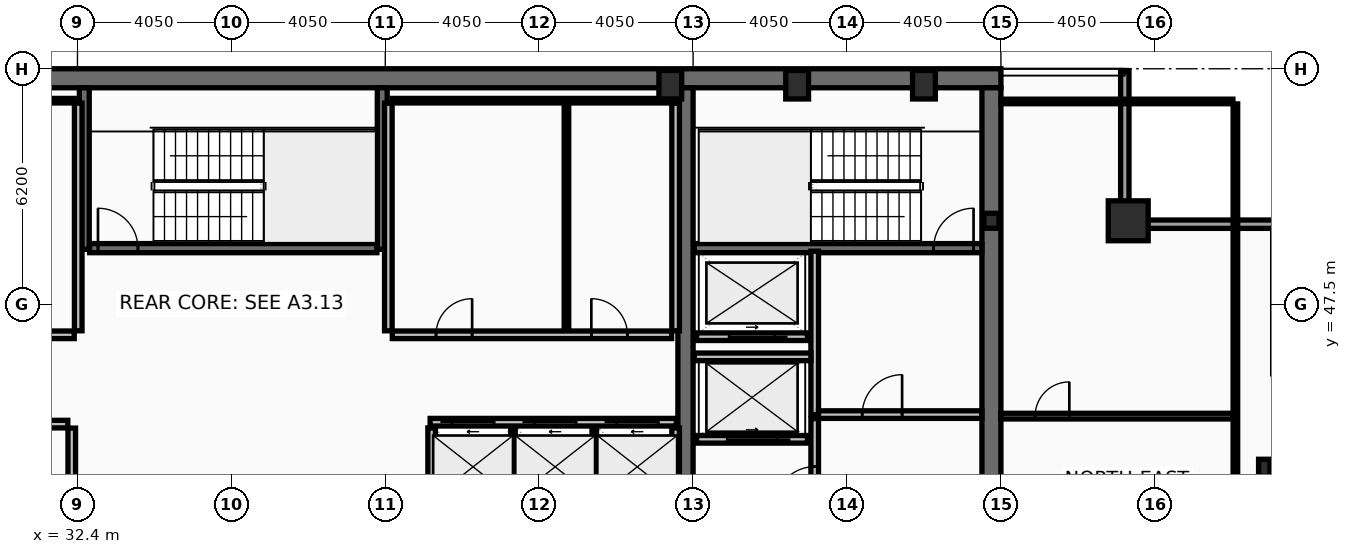
"""IFC4 building model, lengths in metres.
Left out: names, types, materials, properties, quantities, classifications, styles, units other than length and angle.
Written with IfcOpenShell. Run it as: python <this file> out.ifc"""

import sys

from ifc_helpers import new_model, si_unit, direction, frame, frame_2d, origin, origin_2d, place, context, subcontext, project, spatial, rectangle, hollow_rectangle, i_section, extrude, element, fill, save


model = new_model("IFC4")
c1 = context("Model", 3, precision=1e-05, world=origin(), true_north=direction((0.0, 1.0)))
c2 = subcontext(c1, "Body", "Model", "MODEL_VIEW")
j1 = project(units=[si_unit("LENGTHUNIT", "METRE"), si_unit("PLANEANGLEUNIT", "RADIAN")], contexts=[c1])
p1 = place(None, origin())
s1 = spatial("IfcSite", under=j1, at=p1, CompositionType="ELEMENT")
p2 = place(p1, origin())
s2 = spatial("IfcBuilding", under=s1, at=p2, CompositionType="ELEMENT")
p3 = place(p2, frame((0.0, 0.0, 277.0)))
s3 = spatial("IfcBuildingStorey", under=s2, at=p3, CompositionType="ELEMENT", Elevation=277.0)
p4 = place(p3, frame((16.2, 53.45, 0.0), z_axis=(0.0, 0.0, 1.0), x_axis=(1.0, 0.0, 0.0)))
e1 = element("IfcWall", 1, at=p4, inside=s3, PredefinedType="SHEAR", context=c2, shape_type="SweptSolid", body=[
    extrude(rectangle(XDim=40.5, YDim=0.5, at=frame_2d((20.25, 0.0))), origin(), (0.0, 0.0, 1.0), 3.44),
])
p5 = place(p3, frame((56.45, 53.2, 0.0), z_axis=(0.0, 0.0, 1.0), x_axis=(0.0, -1.0, 0.0)))
e2 = element("IfcWall", 2, at=p5, inside=s3, PredefinedType="SHEAR", context=c2, shape_type="SweptSolid", body=[
    extrude(rectangle(XDim=11.4, YDim=0.5, at=frame_2d((5.7, 0.0))), origin(), (0.0, 0.0, 1.0), 3.44),
])
p6 = place(p3, frame((48.4, 41.8, 0.0), z_axis=(0.0, 0.0, 1.0), x_axis=(0.0, 1.0, 0.0)))
e3 = element("IfcWall", 3, at=p6, inside=s3, PredefinedType="SHEAR", context=c2, shape_type="SweptSolid", body=[
    extrude(rectangle(XDim=11.4, YDim=0.4, at=frame_2d((5.7, 0.0))), origin(), (0.0, 0.0, 1.0), 3.44),
])
for number, where, z_axis, x_axis in (
    (4, (32.58, 48.95, 0.0), (0.0, 0.0, 1.0), (0.0, 1.0, 0.0)),
    (5, (40.42, 48.95, 0.0), (0.0, 0.0, 1.0), (0.0, 1.0, 0.0)),
):
    element("IfcWall", number, at=place(p3, frame(where, z_axis=z_axis, x_axis=x_axis)), inside=s3, PredefinedType="SHEAR", context=c2, shape_type="SweptSolid", body=[
        extrude(rectangle(XDim=4.25, YDim=0.26, at=frame_2d((2.125, 0.0))), origin(), (0.0, 0.0, 1.0), 3.44),
    ])
p7 = place(p3, frame((48.63, 48.98, 0.0), z_axis=(0.0, 0.0, 1.0), x_axis=(1.0, 0.0, 0.0)))
e6 = element("IfcWall", 6, at=p7, inside=s3, PredefinedType="SHEAR", context=c2, shape_type="SweptSolid", body=[
    extrude(rectangle(XDim=7.57, YDim=0.24, at=frame_2d((3.785, 0.0))), origin(), (0.0, 0.0, 1.0), 3.44),
])
p8 = place(p7, frame((6.3, 0.0, 0.0)))
e7 = element("IfcOpeningElement", 7, at=p8, cuts=e6, PredefinedType="OPENING", context=c2, shape_type="SweptSolid", body=[
    extrude(rectangle(XDim=1.05, YDim=2.15, at=frame_2d((0.525, 1.075))), frame((0.0, 0.13, 0.0), z_axis=(0.0, -1.0, 0.0), x_axis=(1.0, 0.0, 0.0)), (0.0, 0.0, 1.0), 0.26),
])
p9 = place(p3, frame((32.72, 48.98, 0.0), z_axis=(0.0, 0.0, 1.0), x_axis=(1.0, 0.0, 0.0)))
e8 = element("IfcWall", 8, at=p9, inside=s3, PredefinedType="SHEAR", context=c2, shape_type="SweptSolid", body=[
    extrude(rectangle(XDim=7.56, YDim=0.24, at=frame_2d((3.78, 0.0))), origin(), (0.0, 0.0, 1.0), 3.44),
])
p10 = place(p9, frame((0.22, 0.0, 0.0)))
e9 = element("IfcOpeningElement", 9, at=p10, cuts=e8, PredefinedType="OPENING", context=c2, shape_type="SweptSolid", body=[
    extrude(rectangle(XDim=1.05, YDim=2.15, at=frame_2d((0.525, 1.075))), frame((0.0, 0.13, 0.0), z_axis=(0.0, -1.0, 0.0), x_axis=(1.0, 0.0, 0.0)), (0.0, 0.0, 1.0), 0.26),
])
p11 = place(p3, frame((60.05, 49.7, 0.0), z_axis=(0.0, 0.0, 1.0), x_axis=(1.0, 0.0, 0.0)))
e10 = element("IfcColumn", 10, at=p11, inside=s3, PredefinedType="COLUMN", context=c2, shape_type="SweptSolid", body=[
    extrude(hollow_rectangle(XDim=1.05, YDim=1.05, WallThickness=0.055, at=origin_2d()), origin(), (0.0, 0.0, 1.0), 3.6),
])
for number, where, z_axis, x_axis in (
    (11, (48.0, 53.28, 0.0), (0.0, 0.0, 1.0), (1.0, 0.0, 0.0)),
    (12, (51.337, 53.28, 0.0), (0.0, 0.0, 1.0), (1.0, 0.0, 0.0)),
    (13, (54.675, 53.28, 0.0), (0.0, 0.0, 1.0), (1.0, 0.0, 0.0)),
):
    element("IfcColumn", number, at=place(p3, frame(where, z_axis=z_axis, x_axis=x_axis)), inside=s3, PredefinedType="COLUMN", context=c2, shape_type="SweptSolid", body=[
        extrude(hollow_rectangle(XDim=0.6, YDim=0.75, WallThickness=0.045, at=origin_2d()), origin(), (0.0, 0.0, 1.0), 3.6),
    ])
p12 = place(p3, frame((63.63, 43.2, 0.0), z_axis=(0.0, 0.0, 1.0), x_axis=(1.0, 0.0, 0.0)))
e14 = element("IfcColumn", 14, at=p12, inside=s3, PredefinedType="COLUMN", context=c2, shape_type="SweptSolid", body=[
    extrude(i_section(OverallWidth=0.3, OverallDepth=0.45, WebThickness=0.014, FlangeThickness=0.026, at=origin_2d()), origin(), (0.0, 0.0, 1.0), 3.6),
])
p13 = place(p3, frame((56.45, 49.7, 0.0), z_axis=(0.0, 0.0, 1.0), x_axis=(1.0, 0.0, 0.0)))
e15 = element("IfcColumn", 15, at=p13, inside=s3, PredefinedType="COLUMN", context=c2, shape_type="SweptSolid", body=[
    extrude(i_section(OverallWidth=0.399, OverallDepth=0.393, WebThickness=0.023, FlangeThickness=0.037, at=origin_2d()), origin(), (0.0, 0.0, 1.0), 3.6),
])
p14 = place(p3, frame((59.96, 53.63, 0.0), z_axis=(0.0, 0.0, 1.0), x_axis=(0.0, -1.0, 0.0)))
e16 = element("IfcWall", 16, at=p14, inside=s3, PredefinedType="SOLIDWALL", context=c2, shape_type="SweptSolid", body=[
    extrude(rectangle(XDim=3.91, YDim=0.22, at=frame_2d((1.955, 0.0))), origin(), (0.0, 0.0, 1.0), 2.88),
])
p15 = place(p3, frame((59.85, 49.61, 0.0), z_axis=(0.0, 0.0, 1.0), x_axis=(1.0, 0.0, 0.0)))
e17 = element("IfcWall", 17, at=p15, inside=s3, PredefinedType="SOLIDWALL", context=c2, shape_type="SweptSolid", body=[
    extrude(rectangle(XDim=4.22, YDim=0.22, at=frame_2d((2.11, 0.0))), origin(), (0.0, 0.0, 1.0), 2.88),
])
p16 = place(p3, frame((41.68, 44.4, 0.0), z_axis=(0.0, 0.0, 1.0), x_axis=(1.0, 0.0, 0.0)))
e18 = element("IfcWall", 18, at=p16, inside=s3, PredefinedType="PARTITIONING", context=c2, shape_type="SweptSolid", body=[
    extrude(rectangle(XDim=6.48, YDim=0.2, at=frame_2d((3.24, 0.0))), origin(), (0.0, 0.0, 1.0), 3.44),
])
p17 = place(p16, frame((0.58, 0.0, 0.0)))
e19 = element("IfcOpeningElement", 19, at=p17, cuts=e18, PredefinedType="OPENING", context=c2, shape_type="SweptSolid", body=[
    extrude(rectangle(XDim=1.1, YDim=2.18, at=frame_2d((0.55, 1.09))), frame((0.0, 0.11, 0.0), z_axis=(0.0, -1.0, 0.0), x_axis=(1.0, 0.0, 0.0)), (0.0, 0.0, 1.0), 0.22),
])
p18 = place(p16, frame((2.74, 0.0, 0.0)))
e20 = element("IfcOpeningElement", 20, at=p18, cuts=e18, PredefinedType="OPENING", context=c2, shape_type="SweptSolid", body=[
    extrude(rectangle(XDim=1.1, YDim=2.18, at=frame_2d((0.55, 1.09))), frame((0.0, 0.11, 0.0), z_axis=(0.0, -1.0, 0.0), x_axis=(1.0, 0.0, 0.0)), (0.0, 0.0, 1.0), 0.22),
])
p19 = place(p16, frame((4.9, 0.0, 0.0)))
e21 = element("IfcOpeningElement", 21, at=p19, cuts=e18, PredefinedType="OPENING", context=c2, shape_type="SweptSolid", body=[
    extrude(rectangle(XDim=1.1, YDim=2.18, at=frame_2d((0.55, 1.09))), frame((0.0, 0.11, 0.0), z_axis=(0.0, -1.0, 0.0), x_axis=(1.0, 0.0, 0.0)), (0.0, 0.0, 1.0), 0.22),
])
p20 = place(p3, frame((51.61, 43.95, 0.0), z_axis=(0.0, 0.0, 1.0), x_axis=(-1.0, 0.0, 0.0)))
e22 = element("IfcWall", 22, at=p20, inside=s3, PredefinedType="PARTITIONING", context=c2, shape_type="SweptSolid", body=[
    extrude(rectangle(XDim=2.92, YDim=0.2, at=frame_2d((1.46, 0.0))), origin(), (0.0, 0.0, 1.0), 3.44),
])
p21 = place(p20, frame((0.81, 0.0, 0.0)))
e23 = element("IfcOpeningElement", 23, at=p21, cuts=e22, PredefinedType="OPENING", context=c2, shape_type="SweptSolid", body=[
    extrude(rectangle(XDim=1.3, YDim=2.18, at=frame_2d((0.65, 1.09))), frame((0.0, 0.11, 0.0), z_axis=(0.0, -1.0, 0.0), x_axis=(1.0, 0.0, 0.0)), (0.0, 0.0, 1.0), 0.22),
])
p22 = place(p3, frame((51.61, 46.65, 0.0), z_axis=(0.0, 0.0, 1.0), x_axis=(-1.0, 0.0, 0.0)))
e24 = element("IfcWall", 24, at=p22, inside=s3, PredefinedType="PARTITIONING", context=c2, shape_type="SweptSolid", body=[
    extrude(rectangle(XDim=2.92, YDim=0.2, at=frame_2d((1.46, 0.0))), origin(), (0.0, 0.0, 1.0), 3.44),
])
p23 = place(p22, frame((0.86, 0.0, 0.0)))
e25 = element("IfcOpeningElement", 25, at=p23, cuts=e24, PredefinedType="OPENING", context=c2, shape_type="SweptSolid", body=[
    extrude(rectangle(XDim=1.2, YDim=2.18, at=frame_2d((0.6, 1.09))), frame((0.0, 0.11, 0.0), z_axis=(0.0, -1.0, 0.0), x_axis=(1.0, 0.0, 0.0)), (0.0, 0.0, 1.0), 0.22),
])
p24 = place(p3, frame((51.8, 44.6, 0.0), z_axis=(0.0, 0.0, 1.0), x_axis=(0.0, 1.0, 0.0)))
e26 = element("IfcWall", 26, at=p24, inside=s3, PredefinedType="PARTITIONING", context=c2, shape_type="SweptSolid", body=[
    extrude(rectangle(XDim=4.3, YDim=0.2, at=frame_2d((2.15, 0.0))), origin(), (0.0, 0.0, 1.0), 3.44),
])
p25 = place(p3, frame((51.9, 44.6, 0.0), z_axis=(0.0, 0.0, 1.0), x_axis=(1.0, 0.0, 0.0)))
e27 = element("IfcWall", 27, at=p25, inside=s3, PredefinedType="PARTITIONING", context=c2, shape_type="SweptSolid", body=[
    extrude(rectangle(XDim=4.3, YDim=0.2, at=frame_2d((2.15, 0.0))), origin(), (0.0, 0.0, 1.0), 3.44),
])
p26 = place(p25, frame((1.15, 0.0, 0.0)))
e28 = element("IfcOpeningElement", 28, at=p26, cuts=e27, PredefinedType="OPENING", context=c2, shape_type="SweptSolid", body=[
    extrude(rectangle(XDim=1.05, YDim=2.15, at=frame_2d((0.525, 1.075))), frame((0.0, 0.11, 0.0), z_axis=(0.0, -1.0, 0.0), x_axis=(1.0, 0.0, 0.0)), (0.0, 0.0, 1.0), 0.22),
])
p27 = place(p3, frame((48.63, 46.12, 0.0), z_axis=(0.0, 0.0, 1.0), x_axis=(1.0, 0.0, 0.0)))
e29 = element("IfcWall", 29, at=p27, inside=s3, PredefinedType="PARTITIONING", context=c2, shape_type="SweptSolid", body=[
    extrude(rectangle(XDim=3.07, YDim=0.2, at=frame_2d((1.535, 0.0))), origin(), (0.0, 0.0, 1.0), 3.44),
])
p28 = place(p3, frame((51.8, 41.8, 0.0), z_axis=(0.0, 0.0, 1.0), x_axis=(0.0, 1.0, 0.0)))
e30 = element("IfcWall", 30, at=p28, inside=s3, PredefinedType="PARTITIONING", context=c2, shape_type="SweptSolid", body=[
    extrude(rectangle(XDim=2.695, YDim=0.2, at=frame_2d((1.348, 0.0))), origin(), (0.0, 0.0, 1.0), 3.44),
])
p29 = place(p28, frame((0.38, 0.0, 0.0)))
e31 = element("IfcOpeningElement", 31, at=p29, cuts=e30, PredefinedType="OPENING", context=c2, shape_type="SweptSolid", body=[
    extrude(rectangle(XDim=1.05, YDim=2.15, at=frame_2d((0.525, 1.075))), frame((0.0, 0.11, 0.0), z_axis=(0.0, -1.0, 0.0), x_axis=(1.0, 0.0, 0.0)), (0.0, 0.0, 1.0), 0.22),
])
p30 = place(p3, frame((32.42, 46.805, 0.0), z_axis=(0.0, 0.0, 1.0), x_axis=(0.0, 1.0, 0.0)))
e32 = element("IfcWall", 32, at=p30, inside=s3, PredefinedType="PARTITIONING", context=c2, shape_type="SweptSolid", body=[
    extrude(rectangle(XDim=5.99, YDim=0.2, at=frame_2d((2.995, 0.0))), origin(), (0.0, 0.0, 1.0), 3.44),
])
p31 = place(p3, frame((24.805, 52.86, 0.0), z_axis=(0.0, 0.0, 1.0), x_axis=(1.0, 0.0, 0.0)))
e33 = element("IfcWall", 33, at=p31, inside=s3, PredefinedType="PARTITIONING", context=c2, shape_type="SweptSolid", body=[
    extrude(rectangle(XDim=7.51, YDim=0.12, at=frame_2d((3.755, 0.0))), origin(), (0.0, 0.0, 1.0), 3.44),
])
p32 = place(p3, frame((24.805, 46.7, 0.0), z_axis=(0.0, 0.0, 1.0), x_axis=(1.0, 0.0, 0.0)))
e34 = element("IfcWall", 34, at=p32, inside=s3, PredefinedType="PARTITIONING", context=c2, shape_type="SweptSolid", body=[
    extrude(rectangle(XDim=7.51, YDim=0.2, at=frame_2d((3.755, 0.0))), origin(), (0.0, 0.0, 1.0), 3.44),
])
p33 = place(p32, frame((1.15, 0.0, 0.0)))
e35 = element("IfcOpeningElement", 35, at=p33, cuts=e34, PredefinedType="OPENING", context=c2, shape_type="SweptSolid", body=[
    extrude(rectangle(XDim=0.95, YDim=2.1, at=frame_2d((0.475, 1.05))), frame((0.0, 0.11, 0.0), z_axis=(0.0, -1.0, 0.0), x_axis=(1.0, 0.0, 0.0)), (0.0, 0.0, 1.0), 0.22),
])
p34 = place(p32, frame((5.336, 0.0, 0.0)))
e36 = element("IfcOpeningElement", 36, at=p34, cuts=e34, PredefinedType="OPENING", context=c2, shape_type="SweptSolid", body=[
    extrude(rectangle(XDim=0.95, YDim=2.1, at=frame_2d((0.475, 1.05))), frame((0.0, 0.11, 0.0), z_axis=(0.0, -1.0, 0.0), x_axis=(1.0, 0.0, 0.0)), (0.0, 0.0, 1.0), 0.22),
])
p35 = place(p3, frame((32.25, 41.85, 0.0), z_axis=(0.0, 0.0, 1.0), x_axis=(0.0, 1.0, 0.0)))
e37 = element("IfcWall", 37, at=p35, inside=s3, PredefinedType="PARTITIONING", context=c2, shape_type="SweptSolid", body=[
    extrude(rectangle(XDim=2.395, YDim=0.2, at=frame_2d((1.198, 0.0))), origin(), (0.0, 0.0, 1.0), 3.44),
])
p36 = place(p3, frame((24.805, 44.35, 0.0), z_axis=(0.0, 0.0, 1.0), x_axis=(1.0, 0.0, 0.0)))
e38 = element("IfcWall", 38, at=p36, inside=s3, PredefinedType="PARTITIONING", context=c2, shape_type="SweptSolid", body=[
    extrude(rectangle(XDim=7.34, YDim=0.2, at=frame_2d((3.67, 0.0))), origin(), (0.0, 0.0, 1.0), 3.44),
])
p37 = place(p36, frame((1.15, 0.0, 0.0)))
e39 = element("IfcOpeningElement", 39, at=p37, cuts=e38, PredefinedType="OPENING", context=c2, shape_type="SweptSolid", body=[
    extrude(rectangle(XDim=0.95, YDim=2.1, at=frame_2d((0.475, 1.05))), frame((0.0, 0.11, 0.0), z_axis=(0.0, -1.0, 0.0), x_axis=(1.0, 0.0, 0.0)), (0.0, 0.0, 1.0), 0.22),
])
p38 = place(p36, frame((5.231, 0.0, 0.0)))
e40 = element("IfcOpeningElement", 40, at=p38, cuts=e38, PredefinedType="OPENING", context=c2, shape_type="SweptSolid", body=[
    extrude(rectangle(XDim=0.95, YDim=2.1, at=frame_2d((0.475, 1.05))), frame((0.0, 0.11, 0.0), z_axis=(0.0, -1.0, 0.0), x_axis=(1.0, 0.0, 0.0)), (0.0, 0.0, 1.0), 0.22),
])
for number, where, z_axis, x_axis in (
    (41, (40.58, 46.805, 0.0), (0.0, 0.0, 1.0), (0.0, 1.0, 0.0)),
    (42, (48.14, 46.805, 0.0), (0.0, 0.0, 1.0), (0.0, 1.0, 0.0)),
):
    element("IfcWall", number, at=place(p3, frame(where, z_axis=z_axis, x_axis=x_axis)), inside=s3, PredefinedType="PARTITIONING", context=c2, shape_type="SweptSolid", body=[
        extrude(rectangle(XDim=5.99, YDim=0.2, at=frame_2d((2.995, 0.0))), origin(), (0.0, 0.0, 1.0), 3.44),
    ])
p39 = place(p3, frame((40.685, 52.86, 0.0), z_axis=(0.0, 0.0, 1.0), x_axis=(1.0, 0.0, 0.0)))
e43 = element("IfcWall", 43, at=p39, inside=s3, PredefinedType="PARTITIONING", context=c2, shape_type="SweptSolid", body=[
    extrude(rectangle(XDim=7.35, YDim=0.12, at=frame_2d((3.675, 0.0))), origin(), (0.0, 0.0, 1.0), 3.44),
])
p40 = place(p3, frame((45.267, 46.805, 0.0), z_axis=(0.0, 0.0, 1.0), x_axis=(0.0, 1.0, 0.0)))
e44 = element("IfcWall", 44, at=p40, inside=s3, PredefinedType="PARTITIONING", context=c2, shape_type="SweptSolid", body=[
    extrude(rectangle(XDim=5.99, YDim=0.12, at=frame_2d((2.995, 0.0))), origin(), (0.0, 0.0, 1.0), 3.44),
])
p41 = place(p3, frame((40.685, 46.7, 0.0), z_axis=(0.0, 0.0, 1.0), x_axis=(1.0, 0.0, 0.0)))
e45 = element("IfcWall", 45, at=p41, inside=s3, PredefinedType="PARTITIONING", context=c2, shape_type="SweptSolid", body=[
    extrude(rectangle(XDim=7.35, YDim=0.2, at=frame_2d((3.675, 0.0))), origin(), (0.0, 0.0, 1.0), 3.44),
])
p42 = place(p41, frame((1.15, 0.0, 0.0)))
e46 = element("IfcOpeningElement", 46, at=p42, cuts=e45, PredefinedType="OPENING", context=c2, shape_type="SweptSolid", body=[
    extrude(rectangle(XDim=0.95, YDim=2.1, at=frame_2d((0.475, 1.05))), frame((0.0, 0.11, 0.0), z_axis=(0.0, -1.0, 0.0), x_axis=(1.0, 0.0, 0.0)), (0.0, 0.0, 1.0), 0.22),
])
p43 = place(p41, frame((5.237, 0.0, 0.0)))
e47 = element("IfcOpeningElement", 47, at=p43, cuts=e45, PredefinedType="OPENING", context=c2, shape_type="SweptSolid", body=[
    extrude(rectangle(XDim=0.95, YDim=2.1, at=frame_2d((0.475, 1.05))), frame((0.0, 0.11, 0.0), z_axis=(0.0, -1.0, 0.0), x_axis=(1.0, 0.0, 0.0)), (0.0, 0.0, 1.0), 0.22),
])
for number, where, z_axis, x_axis in (
    (48, (41.72, 41.85, 0.0), (0.0, 0.0, 1.0), (0.0, 1.0, 0.0)),
    (49, (48.14, 41.85, 0.0), (0.0, 0.0, 1.0), (0.0, 1.0, 0.0)),
):
    element("IfcWall", number, at=place(p3, frame(where, z_axis=z_axis, x_axis=x_axis)), inside=s3, PredefinedType="PARTITIONING", context=c2, shape_type="SweptSolid", body=[
        extrude(rectangle(XDim=2.4, YDim=0.2, at=frame_2d((1.2, 0.0))), origin(), (0.0, 0.0, 1.0), 3.44),
    ])
for number, where, z_axis, x_axis in (
    (50, (43.86, 41.85, 0.0), (0.0, 0.0, 1.0), (0.0, 1.0, 0.0)),
    (51, (46.0, 41.85, 0.0), (0.0, 0.0, 1.0), (0.0, 1.0, 0.0)),
):
    element("IfcWall", number, at=place(p3, frame(where, z_axis=z_axis, x_axis=x_axis)), inside=s3, PredefinedType="PARTITIONING", context=c2, shape_type="SweptSolid", body=[
        extrude(rectangle(XDim=2.4, YDim=0.12, at=frame_2d((1.2, 0.0))), origin(), (0.0, 0.0, 1.0), 3.44),
    ])
p44 = place(p3, frame((56.7, 44.56, 0.0), z_axis=(0.0, 0.0, 1.0), x_axis=(1.0, 0.0, 0.0)))
e52 = element("IfcWall", 52, at=p44, inside=s3, PredefinedType="PARTITIONING", context=c2, shape_type="SweptSolid", body=[
    extrude(rectangle(XDim=6.105, YDim=0.15, at=frame_2d((3.052, 0.0))), origin(), (0.0, 0.0, 1.0), 2.88),
])
p45 = place(p44, frame((0.9, 0.0, 0.0)))
e53 = element("IfcOpeningElement", 53, at=p45, cuts=e52, PredefinedType="OPENING", context=c2, shape_type="SweptSolid", body=[
    extrude(rectangle(XDim=0.9, YDim=2.05, at=frame_2d((0.45, 1.025))), frame((0.0, 0.085, 0.0), z_axis=(0.0, -1.0, 0.0), x_axis=(1.0, 0.0, 0.0)), (0.0, 0.0, 1.0), 0.17),
])
p46 = place(p3, frame((62.87, 10.665, 0.0), z_axis=(0.0, 0.0, 1.0), x_axis=(0.0, 1.0, 0.0)))
e54 = element("IfcWall", 54, at=p46, inside=s3, PredefinedType="PARTITIONING", context=c2, shape_type="SweptSolid", body=[
    extrude(rectangle(XDim=42.11, YDim=0.12, at=frame_2d((21.055, 0.0))), origin(), (0.0, 0.0, 1.0), 2.78),
])
p47 = place(p3, frame((56.7, 52.84, 0.0), z_axis=(0.0, 0.0, 1.0), x_axis=(1.0, 0.0, 0.0)))
e55 = element("IfcWall", 55, at=p47, inside=s3, PredefinedType="PARTITIONING", context=c2, shape_type="SweptSolid", body=[
    extrude(rectangle(XDim=6.105, YDim=0.12, at=frame_2d((3.052, 0.0))), origin(), (0.0, 0.0, 1.0), 3.44),
])
p48 = place(p8, origin())
e56 = element("IfcDoor", 56, at=p48, inside=s3, OperationType="SINGLE_SWING_RIGHT", PredefinedType="DOOR", context=c2, shape_type="SweptSolid", body=[
    extrude(rectangle(XDim=1.05, YDim=2.15, at=frame_2d((0.525, 1.075))), frame((0.0, 0.025, 0.0), z_axis=(0.0, -1.0, 0.0), x_axis=(1.0, 0.0, 0.0)), (0.0, 0.0, 1.0), 0.05),
])
fill(e7, e56)
p49 = place(p10, origin())
e57 = element("IfcDoor", 57, at=p49, inside=s3, OperationType="SINGLE_SWING_LEFT", PredefinedType="DOOR", context=c2, shape_type="SweptSolid", body=[
    extrude(rectangle(XDim=1.05, YDim=2.15, at=frame_2d((0.525, 1.075))), frame((0.0, 0.025, 0.0), z_axis=(0.0, -1.0, 0.0), x_axis=(1.0, 0.0, 0.0)), (0.0, 0.0, 1.0), 0.05),
])
fill(e9, e57)
p50 = place(p17, origin())
e58 = element("IfcDoor", 58, at=p50, inside=s3, OperationType="SLIDING_TO_LEFT", PredefinedType="DOOR", context=c2, shape_type="SweptSolid", body=[
    extrude(rectangle(XDim=1.1, YDim=2.18, at=frame_2d((0.55, 1.09))), frame((0.0, 0.025, 0.0), z_axis=(0.0, -1.0, 0.0), x_axis=(1.0, 0.0, 0.0)), (0.0, 0.0, 1.0), 0.05),
])
fill(e19, e58)
p51 = place(p18, origin())
e59 = element("IfcDoor", 59, at=p51, inside=s3, OperationType="SLIDING_TO_LEFT", PredefinedType="DOOR", context=c2, shape_type="SweptSolid", body=[
    extrude(rectangle(XDim=1.1, YDim=2.18, at=frame_2d((0.55, 1.09))), frame((0.0, 0.025, 0.0), z_axis=(0.0, -1.0, 0.0), x_axis=(1.0, 0.0, 0.0)), (0.0, 0.0, 1.0), 0.05),
])
fill(e20, e59)
p52 = place(p19, origin())
e60 = element("IfcDoor", 60, at=p52, inside=s3, OperationType="SLIDING_TO_LEFT", PredefinedType="DOOR", context=c2, shape_type="SweptSolid", body=[
    extrude(rectangle(XDim=1.1, YDim=2.18, at=frame_2d((0.55, 1.09))), frame((0.0, 0.025, 0.0), z_axis=(0.0, -1.0, 0.0), x_axis=(1.0, 0.0, 0.0)), (0.0, 0.0, 1.0), 0.05),
])
fill(e21, e60)
p53 = place(p21, origin())
e61 = element("IfcDoor", 61, at=p53, inside=s3, OperationType="SLIDING_TO_LEFT", PredefinedType="DOOR", context=c2, shape_type="SweptSolid", body=[
    extrude(rectangle(XDim=1.3, YDim=2.18, at=frame_2d((0.65, 1.09))), frame((0.0, 0.025, 0.0), z_axis=(0.0, -1.0, 0.0), x_axis=(1.0, 0.0, 0.0)), (0.0, 0.0, 1.0), 0.05),
])
fill(e23, e61)
p54 = place(p23, origin())
e62 = element("IfcDoor", 62, at=p54, inside=s3, OperationType="SLIDING_TO_LEFT", PredefinedType="DOOR", context=c2, shape_type="SweptSolid", body=[
    extrude(rectangle(XDim=1.2, YDim=2.18, at=frame_2d((0.6, 1.09))), frame((0.0, 0.025, 0.0), z_axis=(0.0, -1.0, 0.0), x_axis=(1.0, 0.0, 0.0)), (0.0, 0.0, 1.0), 0.05),
])
fill(e25, e62)
p55 = place(p26, origin())
e63 = element("IfcDoor", 63, at=p55, inside=s3, OperationType="SINGLE_SWING_RIGHT", PredefinedType="DOOR", context=c2, shape_type="SweptSolid", body=[
    extrude(rectangle(XDim=1.05, YDim=2.15, at=frame_2d((0.525, 1.075))), frame((0.0, 0.025, 0.0), z_axis=(0.0, -1.0, 0.0), x_axis=(1.0, 0.0, 0.0)), (0.0, 0.0, 1.0), 0.05),
])
fill(e28, e63)
p56 = place(p29, origin())
e64 = element("IfcDoor", 64, at=p56, inside=s3, OperationType="SINGLE_SWING_LEFT", PredefinedType="DOOR", context=c2, shape_type="SweptSolid", body=[
    extrude(rectangle(XDim=1.05, YDim=2.15, at=frame_2d((0.525, 1.075))), frame((0.0, 0.025, 0.0), z_axis=(0.0, -1.0, 0.0), x_axis=(1.0, 0.0, 0.0)), (0.0, 0.0, 1.0), 0.05),
])
fill(e31, e64)
p57 = place(p42, origin())
e65 = element("IfcDoor", 65, at=p57, inside=s3, OperationType="SINGLE_SWING_RIGHT", PredefinedType="DOOR", context=c2, shape_type="SweptSolid", body=[
    extrude(rectangle(XDim=0.95, YDim=2.1, at=frame_2d((0.475, 1.05))), frame((0.0, 0.025, 0.0), z_axis=(0.0, -1.0, 0.0), x_axis=(1.0, 0.0, 0.0)), (0.0, 0.0, 1.0), 0.05),
])
fill(e46, e65)
p58 = place(p43, origin())
e66 = element("IfcDoor", 66, at=p58, inside=s3, OperationType="SINGLE_SWING_LEFT", PredefinedType="DOOR", context=c2, shape_type="SweptSolid", body=[
    extrude(rectangle(XDim=0.95, YDim=2.1, at=frame_2d((0.475, 1.05))), frame((0.0, 0.025, 0.0), z_axis=(0.0, -1.0, 0.0), x_axis=(1.0, 0.0, 0.0)), (0.0, 0.0, 1.0), 0.05),
])
fill(e47, e66)
p59 = place(p45, origin())
e67 = element("IfcDoor", 67, at=p59, inside=s3, OperationType="SINGLE_SWING_RIGHT", PredefinedType="DOOR", context=c2, shape_type="SweptSolid", body=[
    extrude(rectangle(XDim=0.9, YDim=2.05, at=frame_2d((0.45, 1.025))), frame((0.0, 0.025, 0.0), z_axis=(0.0, -1.0, 0.0), x_axis=(1.0, 0.0, 0.0)), (0.0, 0.0, 1.0), 0.05),
])
fill(e53, e67)
save(model, sys.argv[1])
